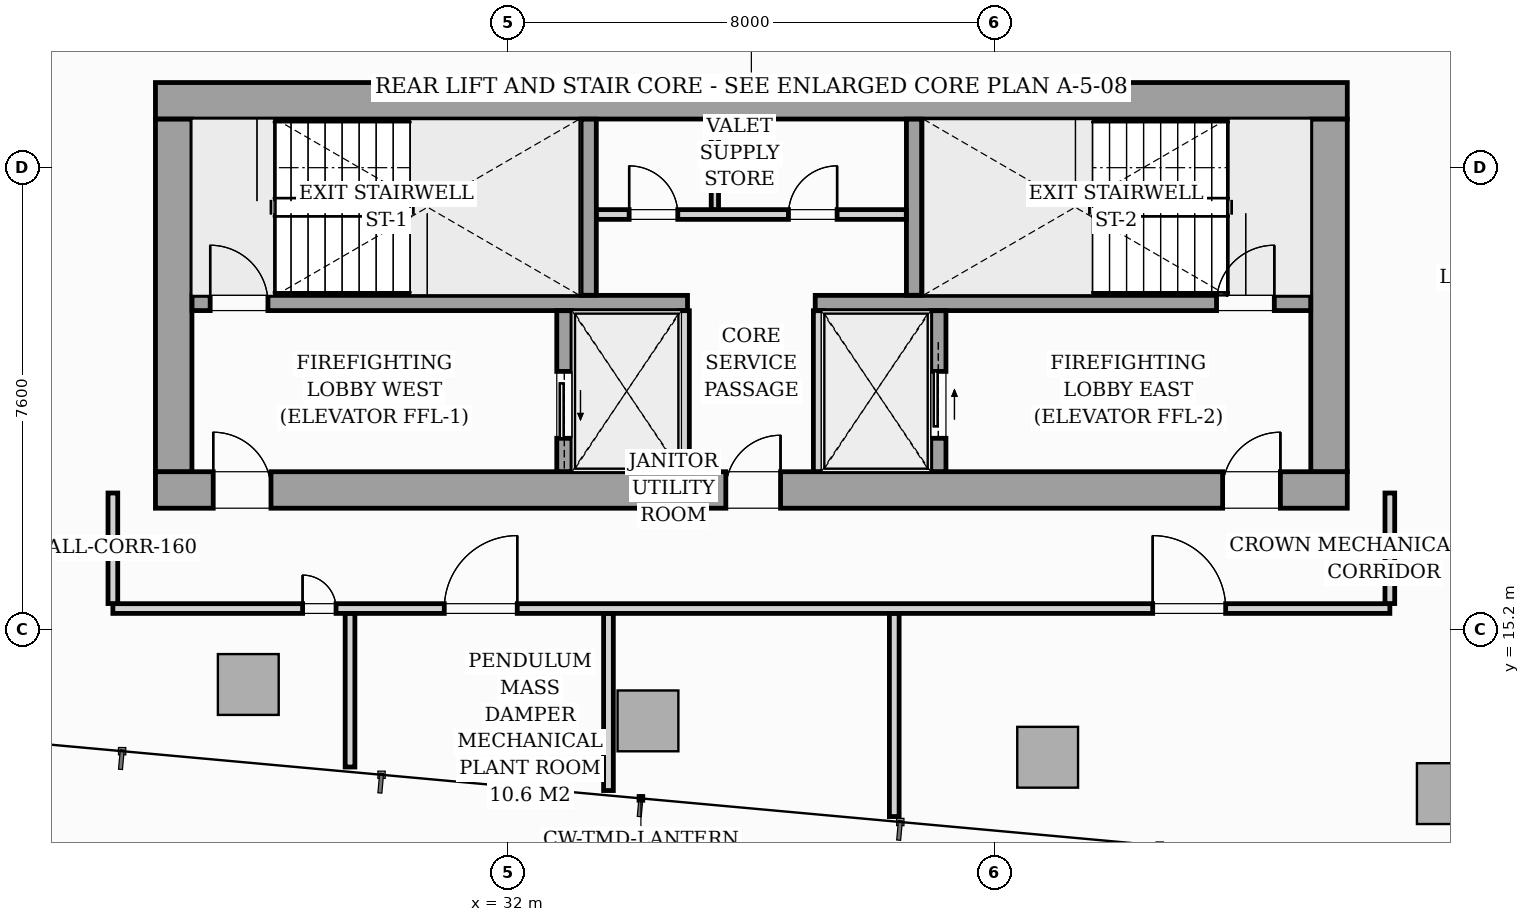
"""IFC4 building model, lengths in metres.
Left out: names, types, materials, properties, quantities, classifications, styles, units other than length and angle.
Written with IfcOpenShell. Run it as: python <this file> out.ifc"""

import sys

from ifc_helpers import new_model, si_unit, direction, frame, frame_2d, origin, origin_2d, place, context, subcontext, project, spatial, rectangle, i_section, extrude, source, transform, mapped, element, fill, save


model = new_model("IFC4")
c1 = context("Model", 3, precision=1e-05, world=origin(), true_north=direction((0.0, 1.0)))
c2 = subcontext(c1, "Body", "Model", "MODEL_VIEW")
j1 = project(units=[si_unit("LENGTHUNIT", "METRE"), si_unit("PLANEANGLEUNIT", "RADIAN")], contexts=[c1])
p1 = place(None, origin())
s1 = spatial("IfcSite", under=j1, at=p1, CompositionType="ELEMENT")
p2 = place(p1, origin())
s2 = spatial("IfcBuilding", under=s1, at=p2, CompositionType="ELEMENT")
p3 = place(p2, frame((0.0, 0.0, 264.3)))
s3 = spatial("IfcBuildingStorey", under=s2, at=p3, CompositionType="ELEMENT", Elevation=264.3)
m1 = source(origin(), c2, "Body", "SweptSolid", [
    extrude(i_section(OverallWidth=0.404, OverallDepth=0.407, WebThickness=0.027, FlangeThickness=0.044, FilletRadius=0.018, at=origin_2d()), origin(), (0.0, 0.0, 1.0), 6.496),
])
for number, where, z_axis, x_axis in (
    (1, (26.4, 17.4, 0.002), (0.0, 0.0, 1.0), (1.0, 0.0, 0.0)),
    (2, (33.12, 17.4, 0.002), (0.0, 0.0, 1.0), (1.0, 0.0, 0.0)),
    (3, (38.88, 17.4, 0.002), (0.0, 0.0, 1.0), (1.0, 0.0, 0.0)),
    (4, (45.6, 17.4, 0.002), (0.0, 0.0, 1.0), (1.0, 0.0, 0.0)),
    (5, (26.4, 24.0, 0.002), (0.0, 0.0, 1.0), (1.0, 0.0, 0.0)),
    (6, (33.12, 24.0, 0.002), (0.0, 0.0, 1.0), (1.0, 0.0, 0.0)),
    (7, (38.88, 24.0, 0.002), (0.0, 0.0, 1.0), (1.0, 0.0, 0.0)),
    (8, (45.6, 24.0, 0.002), (0.0, 0.0, 1.0), (1.0, 0.0, 0.0)),
):
    element("IfcColumn", number, at=place(p3, frame(where, z_axis=z_axis, x_axis=x_axis)), inside=s3, PredefinedType="PILASTER", context=c2, shape_type="MappedRepresentation", body=[
        mapped(m1, transform((0.0, 0.0, 0.0), scale=1.0)),
    ])
m2 = source(origin(), c2, "Body", "SweptSolid", [
    extrude(rectangle(XDim=1.0, YDim=1.0, at=origin_2d()), origin(), (0.0, 0.0, 1.0), 6.494),
])
for number, where, z_axis, x_axis in (
    (9, (27.727, 14.301, 0.004), (0.0, 0.0, 1.0), (0.996, -0.091, 0.0)),
    (10, (34.3, 13.703, 0.004), (0.0, 0.0, 1.0), (0.996, -0.091, 0.0)),
    (11, (40.873, 13.104, 0.004), (0.0, 0.0, 1.0), (0.996, -0.091, 0.0)),
    (12, (47.445, 12.506, 0.004), (0.0, 0.0, 1.0), (0.996, -0.091, 0.0)),
):
    element("IfcColumn", number, at=place(p3, frame(where, z_axis=z_axis, x_axis=x_axis)), inside=s3, PredefinedType="COLUMN", context=c2, shape_type="MappedRepresentation", body=[
        mapped(m2, transform((0.0, 0.0, 0.0), scale=1.0)),
    ])
p4 = place(p3, frame((46.541, 24.959, 0.0), z_axis=(0.0, 0.0, 1.0), x_axis=(0.995890823101, -0.090561959246, 0.0)))
e13 = element("IfcWall", 13, at=p4, inside=s3, PredefinedType="STANDARD", context=c2, shape_type="SweptSolid", body=[
    extrude(rectangle(XDim=1.679, YDim=0.26, at=frame_2d((0.84, 0.0))), origin(), (0.0, 0.0, 1.0), 6.2),
])
p5 = place(p3, frame((26.2, 17.5, 0.0), z_axis=(0.0, 0.0, 1.0), x_axis=(1.0, 0.0, 0.0)))
e14 = element("IfcWall", 14, at=p5, inside=s3, PredefinedType="SHEAR", context=c2, shape_type="SweptSolid", body=[
    extrude(rectangle(XDim=19.6, YDim=0.6, at=frame_2d((9.8, 0.0))), origin(), (0.0, 0.0, 1.0), 6.5),
])
p6 = place(p5, frame((0.95, 0.0, 0.0)))
e15 = element("IfcOpeningElement", 15, at=p6, cuts=e14, PredefinedType="OPENING", context=c2, shape_type="SweptSolid", body=[
    extrude(rectangle(XDim=0.95, YDim=2.06, at=frame_2d((0.475, 1.03))), frame((0.0, 0.31, 0.0), z_axis=(0.0, -1.0, 0.0), x_axis=(1.0, 0.0, 0.0)), (0.0, 0.0, 1.0), 0.62),
])
p7 = place(p5, frame((9.38, 0.0, 0.0)))
e16 = element("IfcOpeningElement", 16, at=p7, cuts=e14, PredefinedType="OPENING", context=c2, shape_type="SweptSolid", body=[
    extrude(rectangle(XDim=0.9, YDim=2.06, at=frame_2d((0.45, 1.03))), frame((0.0, 0.31, 0.0), z_axis=(0.0, -1.0, 0.0), x_axis=(1.0, 0.0, 0.0)), (0.0, 0.0, 1.0), 0.62),
])
p8 = place(p5, frame((17.55, 0.0, 0.0)))
e17 = element("IfcOpeningElement", 17, at=p8, cuts=e14, PredefinedType="OPENING", context=c2, shape_type="SweptSolid", body=[
    extrude(rectangle(XDim=0.95, YDim=2.06, at=frame_2d((0.475, 1.03))), frame((0.0, 0.31, 0.0), z_axis=(0.0, -1.0, 0.0), x_axis=(1.0, 0.0, 0.0)), (0.0, 0.0, 1.0), 0.62),
])
p9 = place(p3, frame((26.2, 23.9, 0.0), z_axis=(0.0, 0.0, 1.0), x_axis=(1.0, 0.0, 0.0)))
e18 = element("IfcWall", 18, at=p9, inside=s3, PredefinedType="SHEAR", context=c2, shape_type="SweptSolid", body=[
    extrude(rectangle(XDim=19.6, YDim=0.6, at=frame_2d((9.8, 0.0))), origin(), (0.0, 0.0, 1.0), 6.5),
])
for number, where, z_axis, x_axis in (
    (19, (26.5, 17.802, 0.0), (0.0, 0.0, 1.0), (0.0, 1.0, 0.0)),
    (20, (45.5, 17.802, 0.0), (0.0, 0.0, 1.0), (0.0, 1.0, 0.0)),
):
    element("IfcWall", number, at=place(p3, frame(where, z_axis=z_axis, x_axis=x_axis)), inside=s3, PredefinedType="SHEAR", context=c2, shape_type="SweptSolid", body=[
        extrude(rectangle(XDim=5.796, YDim=0.6, at=frame_2d((2.898, 0.0))), origin(), (0.0, 0.0, 1.0), 6.5),
    ])
p10 = place(p3, frame((26.802, 20.575, 0.0), z_axis=(0.0, 0.0, 1.0), x_axis=(1.0, 0.0, 0.0)))
e21 = element("IfcWall", 21, at=p10, inside=s3, PredefinedType="SOLIDWALL", context=c2, shape_type="SweptSolid", body=[
    extrude(rectangle(XDim=8.148, YDim=0.25, at=frame_2d((4.074, 0.0))), origin(), (0.0, 0.0, 1.0), 6.5),
])
p11 = place(p10, frame((0.298, 0.0, 0.0)))
e22 = element("IfcOpeningElement", 22, at=p11, cuts=e21, PredefinedType="OPENING", context=c2, shape_type="SweptSolid", body=[
    extrude(rectangle(XDim=0.95, YDim=2.06, at=frame_2d((0.475, 1.03))), frame((0.0, 0.135, 0.0), z_axis=(0.0, -1.0, 0.0), x_axis=(1.0, 0.0, 0.0)), (0.0, 0.0, 1.0), 0.27),
])
p12 = place(p3, frame((37.05, 20.575, 0.0), z_axis=(0.0, 0.0, 1.0), x_axis=(1.0, 0.0, 0.0)))
e23 = element("IfcWall", 23, at=p12, inside=s3, PredefinedType="SOLIDWALL", context=c2, shape_type="SweptSolid", body=[
    extrude(rectangle(XDim=8.148, YDim=0.25, at=frame_2d((4.074, 0.0))), origin(), (0.0, 0.0, 1.0), 6.5),
])
p13 = place(p12, frame((6.6, 0.0, 0.0)))
e24 = element("IfcOpeningElement", 24, at=p13, cuts=e23, PredefinedType="OPENING", context=c2, shape_type="SweptSolid", body=[
    extrude(rectangle(XDim=0.95, YDim=2.06, at=frame_2d((0.475, 1.03))), frame((0.0, 0.135, 0.0), z_axis=(0.0, -1.0, 0.0), x_axis=(1.0, 0.0, 0.0)), (0.0, 0.0, 1.0), 0.27),
])
for number, where, z_axis, x_axis in (
    (25, (33.325, 20.702, 0.0), (0.0, 0.0, 1.0), (0.0, 1.0, 0.0)),
    (26, (38.675, 20.702, 0.0), (0.0, 0.0, 1.0), (0.0, 1.0, 0.0)),
):
    element("IfcWall", number, at=place(p3, frame(where, z_axis=z_axis, x_axis=x_axis)), inside=s3, PredefinedType="SOLIDWALL", context=c2, shape_type="SweptSolid", body=[
        extrude(rectangle(XDim=2.896, YDim=0.25, at=frame_2d((1.448, 0.0))), origin(), (0.0, 0.0, 1.0), 6.5),
    ])
p14 = place(p3, frame((32.925, 17.802, 0.0), z_axis=(0.0, 0.0, 1.0), x_axis=(0.0, 1.0, 0.0)))
e27 = element("IfcWall", 27, at=p14, inside=s3, PredefinedType="SOLIDWALL", context=c2, shape_type="SweptSolid", body=[
    extrude(rectangle(XDim=2.646, YDim=0.25, at=frame_2d((1.323, 0.0))), origin(), (0.0, 0.0, 1.0), 6.5),
])
p15 = place(p14, frame((0.548, 0.0, 0.0)))
e28 = element("IfcOpeningElement", 28, at=p15, cuts=e27, PredefinedType="OPENING", context=c2, shape_type="SweptSolid", body=[
    extrude(rectangle(XDim=1.1, YDim=2.08, at=frame_2d((0.55, 1.04))), frame((0.0, 0.135, 0.0), z_axis=(0.0, -1.0, 0.0), x_axis=(1.0, 0.0, 0.0)), (0.0, 0.0, 1.0), 0.27),
])
for number, where, z_axis, x_axis in (
    (29, (34.9, 17.802, 0.0), (0.0, 0.0, 1.0), (0.0, 1.0, 0.0)),
    (30, (37.1, 17.802, 0.0), (0.0, 0.0, 1.0), (0.0, 1.0, 0.0)),
):
    element("IfcWall", number, at=place(p3, frame(where, z_axis=z_axis, x_axis=x_axis)), inside=s3, PredefinedType="PARTITIONING", context=c2, shape_type="SweptSolid", body=[
        extrude(rectangle(XDim=2.646, YDim=0.16, at=frame_2d((1.323, 0.0))), origin(), (0.0, 0.0, 1.0), 6.2),
    ])
p16 = place(p3, frame((39.075, 17.802, 0.0), z_axis=(0.0, 0.0, 1.0), x_axis=(0.0, 1.0, 0.0)))
e31 = element("IfcWall", 31, at=p16, inside=s3, PredefinedType="SOLIDWALL", context=c2, shape_type="SweptSolid", body=[
    extrude(rectangle(XDim=2.646, YDim=0.25, at=frame_2d((1.323, 0.0))), origin(), (0.0, 0.0, 1.0), 6.5),
])
p17 = place(p16, frame((0.548, 0.0, 0.0)))
e32 = element("IfcOpeningElement", 32, at=p17, cuts=e31, PredefinedType="OPENING", context=c2, shape_type="SweptSolid", body=[
    extrude(rectangle(XDim=1.1, YDim=2.08, at=frame_2d((0.55, 1.04))), frame((0.0, 0.135, 0.0), z_axis=(0.0, -1.0, 0.0), x_axis=(1.0, 0.0, 0.0)), (0.0, 0.0, 1.0), 0.27),
])
p18 = place(p3, frame((33.452, 22.03, 0.0), z_axis=(0.0, 0.0, 1.0), x_axis=(1.0, 0.0, 0.0)))
e33 = element("IfcWall", 33, at=p18, inside=s3, PredefinedType="PARTITIONING", context=c2, shape_type="SweptSolid", body=[
    extrude(rectangle(XDim=5.096, YDim=0.16, at=frame_2d((2.548, 0.0))), origin(), (0.0, 0.0, 1.0), 6.2),
])
p19 = place(p18, frame((0.538, 0.0, 0.0)))
e34 = element("IfcOpeningElement", 34, at=p19, cuts=e33, PredefinedType="OPENING", context=c2, shape_type="SweptSolid", body=[
    extrude(rectangle(XDim=0.8, YDim=2.05, at=frame_2d((0.4, 1.025))), frame((0.0, 0.09, 0.0), z_axis=(0.0, -1.0, 0.0), x_axis=(1.0, 0.0, 0.0)), (0.0, 0.0, 1.0), 0.18),
])
p20 = place(p18, frame((3.158, 0.0, 0.0)))
e35 = element("IfcOpeningElement", 35, at=p20, cuts=e33, PredefinedType="OPENING", context=c2, shape_type="SweptSolid", body=[
    extrude(rectangle(XDim=0.8, YDim=2.05, at=frame_2d((0.4, 1.025))), frame((0.0, 0.09, 0.0), z_axis=(0.0, -1.0, 0.0), x_axis=(1.0, 0.0, 0.0)), (0.0, 0.0, 1.0), 0.18),
])
p21 = place(p3, frame((35.4, 22.112, 0.0), z_axis=(0.0, 0.0, 1.0), x_axis=(0.0, 1.0, 0.0)))
e36 = element("IfcWall", 36, at=p21, inside=s3, PredefinedType="PARTITIONING", context=c2, shape_type="SweptSolid", body=[
    extrude(rectangle(XDim=1.486, YDim=0.12, at=frame_2d((0.743, 0.0))), origin(), (0.0, 0.0, 1.0), 6.2),
])
p22 = place(p3, frame((25.5, 15.55, 0.0), z_axis=(0.0, 0.0, 1.0), x_axis=(1.0, 0.0, 0.0)))
e37 = element("IfcWall", 37, at=p22, inside=s3, PredefinedType="PARTITIONING", context=c2, shape_type="SweptSolid", body=[
    extrude(rectangle(XDim=21.0, YDim=0.16, at=frame_2d((10.5, 0.0))), origin(), (0.0, 0.0, 1.0), 5.756),
])
p23 = place(p22, frame((3.12, 0.0, 0.0)))
e38 = element("IfcOpeningElement", 38, at=p23, cuts=e37, PredefinedType="OPENING", context=c2, shape_type="SweptSolid", body=[
    extrude(rectangle(XDim=0.55, YDim=2.02, at=frame_2d((0.275, 1.01))), frame((0.0, 0.09, 0.0), z_axis=(0.0, -1.0, 0.0), x_axis=(1.0, 0.0, 0.0)), (0.0, 0.0, 1.0), 0.18),
])
p24 = place(p22, frame((5.45, 0.0, 0.0)))
e39 = element("IfcOpeningElement", 39, at=p24, cuts=e37, PredefinedType="OPENING", context=c2, shape_type="SweptSolid", body=[
    extrude(rectangle(XDim=1.2, YDim=2.08, at=frame_2d((0.6, 1.04))), frame((0.0, 0.09, 0.0), z_axis=(0.0, -1.0, 0.0), x_axis=(1.0, 0.0, 0.0)), (0.0, 0.0, 1.0), 0.18),
])
p25 = place(p22, frame((17.1, 0.0, 0.0)))
e40 = element("IfcOpeningElement", 40, at=p25, cuts=e37, PredefinedType="OPENING", context=c2, shape_type="SweptSolid", body=[
    extrude(rectangle(XDim=1.2, YDim=2.08, at=frame_2d((0.6, 1.04))), frame((0.0, 0.09, 0.0), z_axis=(0.0, -1.0, 0.0), x_axis=(1.0, 0.0, 0.0)), (0.0, 0.0, 1.0), 0.18),
])
for number, where, z_axis, x_axis in (
    (41, (25.5, 15.632, 0.0), (0.0, 0.0, 1.0), (0.0, 1.0, 0.0)),
    (42, (46.5, 15.632, 0.0), (0.0, 0.0, 1.0), (0.0, 1.0, 0.0)),
):
    element("IfcWall", number, at=place(p3, frame(where, z_axis=z_axis, x_axis=x_axis)), inside=s3, PredefinedType="PARTITIONING", context=c2, shape_type="SweptSolid", body=[
        extrude(rectangle(XDim=1.818, YDim=0.16, at=frame_2d((0.909, 0.0))), origin(), (0.0, 0.0, 1.0), 6.2),
    ])
p26 = place(p3, frame((29.4, 12.944, 0.0), z_axis=(0.0, 0.0, 1.0), x_axis=(0.0, 1.0, 0.0)))
e43 = element("IfcWall", 43, at=p26, inside=s3, PredefinedType="PARTITIONING", context=c2, shape_type="SweptSolid", body=[
    extrude(rectangle(XDim=2.524, YDim=0.16, at=frame_2d((1.262, 0.0))), origin(), (0.0, 0.0, 1.0), 6.2),
])
p27 = place(p3, frame((38.35, 12.129, 0.0), z_axis=(0.0, 0.0, 1.0), x_axis=(0.0, 1.0, 0.0)))
e44 = element("IfcWall", 44, at=p27, inside=s3, PredefinedType="PARTITIONING", context=c2, shape_type="SweptSolid", body=[
    extrude(rectangle(XDim=3.339, YDim=0.16, at=frame_2d((1.669, 0.0))), origin(), (0.0, 0.0, 1.0), 6.2),
])
p28 = place(p3, frame((33.65, 12.557, 0.0), z_axis=(0.0, 0.0, 1.0), x_axis=(0.0, 1.0, 0.0)))
e45 = element("IfcWall", 45, at=p28, inside=s3, PredefinedType="PARTITIONING", context=c2, shape_type="SweptSolid", body=[
    extrude(rectangle(XDim=2.911, YDim=0.16, at=frame_2d((1.456, 0.0))), origin(), (0.0, 0.0, 1.0), 6.2),
])
m3 = source(origin(), c2, "Body", "SweptSolid", [
    extrude(rectangle(XDim=0.95, YDim=2.06, at=frame_2d((0.475, 1.03))), frame((0.0, 0.025, 0.0), z_axis=(0.0, -1.0, 0.0), x_axis=(1.0, 0.0, 0.0)), (0.0, 0.0, 1.0), 0.05),
])
p29 = place(p6, origin())
e46 = element("IfcDoor", 46, at=p29, inside=s3, OperationType="SINGLE_SWING_LEFT", PredefinedType="DOOR", context=c2, shape_type="MappedRepresentation", body=[
    mapped(m3, transform((0.0, 0.0, 0.0), scale=1.0)),
])
fill(e15, e46)
m4 = source(origin(), c2, "Body", "SweptSolid", [
    extrude(rectangle(XDim=0.9, YDim=2.06, at=frame_2d((0.45, 1.03))), frame((0.0, 0.025, 0.0), z_axis=(0.0, -1.0, 0.0), x_axis=(1.0, 0.0, 0.0)), (0.0, 0.0, 1.0), 0.05),
])
p30 = place(p7, origin())
e47 = element("IfcDoor", 47, at=p30, inside=s3, OperationType="SINGLE_SWING_RIGHT", PredefinedType="DOOR", context=c2, shape_type="MappedRepresentation", body=[
    mapped(m4, transform((0.0, 0.0, 0.0), scale=1.0)),
])
fill(e16, e47)
p31 = place(p8, origin())
e48 = element("IfcDoor", 48, at=p31, inside=s3, OperationType="SINGLE_SWING_RIGHT", PredefinedType="DOOR", context=c2, shape_type="MappedRepresentation", body=[
    mapped(m3, transform((0.0, 0.0, 0.0), scale=1.0)),
])
fill(e17, e48)
p32 = place(p11, origin())
e49 = element("IfcDoor", 49, at=p32, inside=s3, OperationType="SINGLE_SWING_LEFT", PredefinedType="DOOR", context=c2, shape_type="MappedRepresentation", body=[
    mapped(m3, transform((0.0, 0.0, 0.0), scale=1.0)),
])
fill(e22, e49)
p33 = place(p13, origin())
e50 = element("IfcDoor", 50, at=p33, inside=s3, OperationType="SINGLE_SWING_RIGHT", PredefinedType="DOOR", context=c2, shape_type="MappedRepresentation", body=[
    mapped(m3, transform((0.0, 0.0, 0.0), scale=1.0)),
])
fill(e24, e50)
m5 = source(origin(), c2, "Body", "SweptSolid", [
    extrude(rectangle(XDim=1.1, YDim=2.08, at=frame_2d((0.55, 1.04))), frame((0.0, 0.025, 0.0), z_axis=(0.0, -1.0, 0.0), x_axis=(1.0, 0.0, 0.0)), (0.0, 0.0, 1.0), 0.05),
])
p34 = place(p15, origin())
e51 = element("IfcDoor", 51, at=p34, inside=s3, OperationType="SLIDING_TO_LEFT", PredefinedType="DOOR", context=c2, shape_type="MappedRepresentation", body=[
    mapped(m5, transform((0.0, 0.0, 0.0), scale=1.0)),
])
fill(e28, e51)
p35 = place(p17, origin())
e52 = element("IfcDoor", 52, at=p35, inside=s3, OperationType="SLIDING_TO_RIGHT", PredefinedType="DOOR", context=c2, shape_type="MappedRepresentation", body=[
    mapped(m5, transform((0.0, 0.0, 0.0), scale=1.0)),
])
fill(e32, e52)
m6 = source(origin(), c2, "Body", "SweptSolid", [
    extrude(rectangle(XDim=0.8, YDim=2.05, at=frame_2d((0.4, 1.025))), frame((0.0, 0.025, 0.0), z_axis=(0.0, -1.0, 0.0), x_axis=(1.0, 0.0, 0.0)), (0.0, 0.0, 1.0), 0.05),
])
p36 = place(p19, origin())
e53 = element("IfcDoor", 53, at=p36, inside=s3, OperationType="SINGLE_SWING_LEFT", PredefinedType="DOOR", context=c2, shape_type="MappedRepresentation", body=[
    mapped(m6, transform((0.0, 0.0, 0.0), scale=1.0)),
])
fill(e34, e53)
p37 = place(p20, origin())
e54 = element("IfcDoor", 54, at=p37, inside=s3, OperationType="SINGLE_SWING_RIGHT", PredefinedType="DOOR", context=c2, shape_type="MappedRepresentation", body=[
    mapped(m6, transform((0.0, 0.0, 0.0), scale=1.0)),
])
fill(e35, e54)
m7 = source(origin(), c2, "Body", "SweptSolid", [
    extrude(rectangle(XDim=0.55, YDim=2.02, at=frame_2d((0.275, 1.01))), frame((0.0, 0.025, 0.0), z_axis=(0.0, -1.0, 0.0), x_axis=(1.0, 0.0, 0.0)), (0.0, 0.0, 1.0), 0.05),
])
p38 = place(p23, origin())
e55 = element("IfcDoor", 55, at=p38, inside=s3, OperationType="SINGLE_SWING_LEFT", PredefinedType="DOOR", context=c2, shape_type="MappedRepresentation", body=[
    mapped(m7, transform((0.0, 0.0, 0.0), scale=1.0)),
])
fill(e38, e55)
m8 = source(origin(), c2, "Body", "SweptSolid", [
    extrude(rectangle(XDim=1.2, YDim=2.08, at=frame_2d((0.6, 1.04))), frame((0.0, 0.025, 0.0), z_axis=(0.0, -1.0, 0.0), x_axis=(1.0, 0.0, 0.0)), (0.0, 0.0, 1.0), 0.05),
])
p39 = place(p24, origin())
e56 = element("IfcDoor", 56, at=p39, inside=s3, OperationType="SINGLE_SWING_RIGHT", PredefinedType="DOOR", context=c2, shape_type="MappedRepresentation", body=[
    mapped(m8, transform((0.0, 0.0, 0.0), scale=1.0)),
])
fill(e39, e56)
p40 = place(p25, origin())
e57 = element("IfcDoor", 57, at=p40, inside=s3, OperationType="SINGLE_SWING_LEFT", PredefinedType="DOOR", context=c2, shape_type="MappedRepresentation", body=[
    mapped(m8, transform((0.0, 0.0, 0.0), scale=1.0)),
])
fill(e40, e57)
save(model, sys.argv[1])
